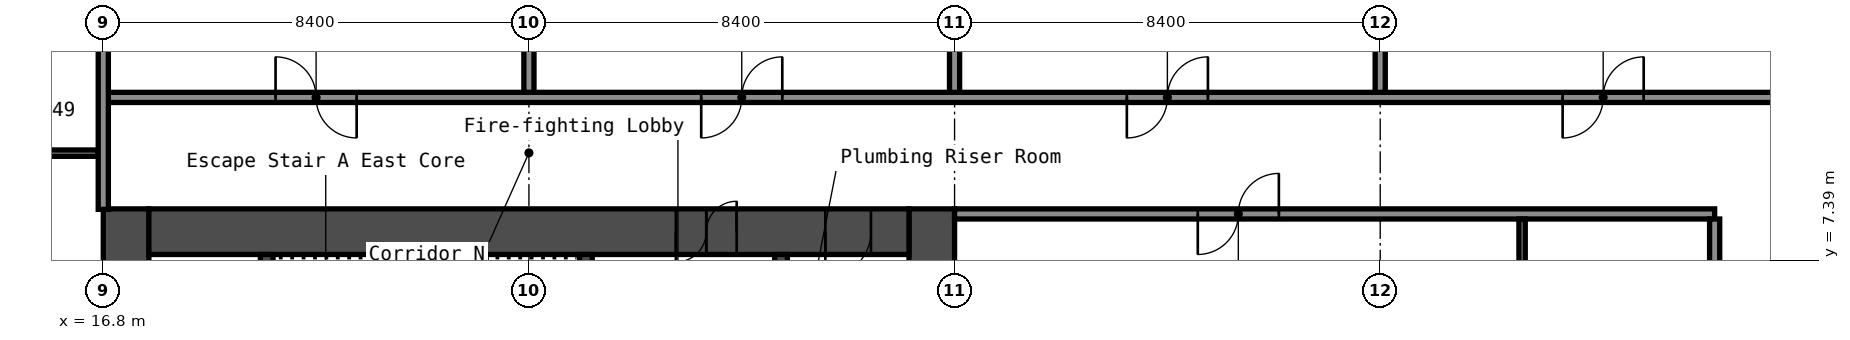
"""IFC4 building model, lengths in metres.
Left out: names, types, materials, properties, quantities, classifications, styles, units other than length and angle.
Written with IfcOpenShell. Run it as: python <this file> out.ifc"""

import sys

from ifc_helpers import new_model, si_unit, direction, frame, frame_2d, origin, place, context, subcontext, project, spatial, rectangle, extrude, element, fill, save


model = new_model("IFC4")
c1 = context("Model", 3, precision=1e-05, world=origin(), true_north=direction((0.0, 1.0)))
c2 = subcontext(c1, "Body", "Model", "MODEL_VIEW")
j1 = project(units=[si_unit("LENGTHUNIT", "METRE"), si_unit("PLANEANGLEUNIT", "RADIAN")], contexts=[c1])
p1 = place(None, origin())
s1 = spatial("IfcSite", under=j1, at=p1, CompositionType="ELEMENT")
p2 = place(p1, origin())
s2 = spatial("IfcBuilding", under=s1, at=p2, CompositionType="ELEMENT")
p3 = place(p2, frame((0.0, 0.0, 29.4)))
s3 = spatial("IfcBuildingStorey", under=s2, at=p3, CompositionType="ELEMENT", Elevation=29.4)
p4 = place(p3, frame((17.25, -8.4, 0.0), z_axis=(0.0, 0.0, 1.0), x_axis=(0.0, 1.0, 0.0)))
e1 = element("IfcWall", 1, at=p4, inside=s3, PredefinedType="SHEAR", context=c2, shape_type="SweptSolid", body=[
    extrude(rectangle(XDim=16.8, YDim=0.9, at=frame_2d((8.4, 0.0))), origin(), (0.0, 0.0, 1.0), 2.8),
])
p5 = place(p4, frame((12.75, 0.0, 0.0)))
e2 = element("IfcOpeningElement", 2, at=p5, cuts=e1, PredefinedType="OPENING", context=c2, shape_type="SweptSolid", body=[
    extrude(rectangle(XDim=1.2, YDim=2.1, at=frame_2d((0.6, 1.05))), frame((0.0, 0.46, 0.0), z_axis=(0.0, -1.0, 0.0), x_axis=(1.0, 0.0, 0.0)), (0.0, 0.0, 1.0), 0.92),
])
p6 = place(p4, frame((2.85, 0.0, 0.0)))
e3 = element("IfcOpeningElement", 3, at=p6, cuts=e1, PredefinedType="OPENING", context=c2, shape_type="SweptSolid", body=[
    extrude(rectangle(XDim=1.2, YDim=2.1, at=frame_2d((0.6, 1.05))), frame((0.0, 0.46, 0.0), z_axis=(0.0, -1.0, 0.0), x_axis=(1.0, 0.0, 0.0)), (0.0, 0.0, 1.0), 0.92),
])
p7 = place(p3, frame((33.15, -8.4, 0.0), z_axis=(0.0, 0.0, 1.0), x_axis=(0.0, 1.0, 0.0)))
e4 = element("IfcWall", 4, at=p7, inside=s3, PredefinedType="SHEAR", context=c2, shape_type="SweptSolid", body=[
    extrude(rectangle(XDim=16.8, YDim=0.9, at=frame_2d((8.4, 0.0))), origin(), (0.0, 0.0, 1.0), 2.8),
])
p8 = place(p3, frame((17.7, 7.95, 0.0), z_axis=(0.0, 0.0, 1.0), x_axis=(1.0, 0.0, 0.0)))
e5 = element("IfcWall", 5, at=p8, inside=s3, PredefinedType="SHEAR", context=c2, shape_type="SweptSolid", body=[
    extrude(rectangle(XDim=15.0, YDim=0.9, at=frame_2d((7.5, 0.0))), origin(), (0.0, 0.0, 1.0), 2.8),
])
p9 = place(p8, frame((10.4, 0.0, 0.0)))
e6 = element("IfcOpeningElement", 6, at=p9, cuts=e5, PredefinedType="OPENING", context=c2, shape_type="SweptSolid", body=[
    extrude(rectangle(XDim=1.2, YDim=2.1, at=frame_2d((0.6, 1.05))), frame((0.0, 0.46, 0.0), z_axis=(0.0, -1.0, 0.0), x_axis=(1.0, 0.0, 0.0)), (0.0, 0.0, 1.0), 0.92),
])
p10 = place(p8, frame((13.35, 0.0, 0.0)))
e7 = element("IfcOpeningElement", 7, at=p10, cuts=e5, PredefinedType="OPENING", context=c2, shape_type="SweptSolid", body=[
    extrude(rectangle(XDim=0.9, YDim=2.1, at=frame_2d((0.45, 1.05))), frame((0.0, 0.46, 0.0), z_axis=(0.0, -1.0, 0.0), x_axis=(1.0, 0.0, 0.0)), (0.0, 0.0, 1.0), 0.92),
])
p11 = place(p3, frame((20.025, 1.2, 0.0), z_axis=(0.0, 0.0, 1.0), x_axis=(0.0, 1.0, 0.0)))
e8 = element("IfcWall", 8, at=p11, inside=s3, PredefinedType="SHEAR", context=c2, shape_type="SweptSolid", body=[
    extrude(rectangle(XDim=6.3, YDim=0.25, at=frame_2d((3.15, 0.0))), origin(), (0.0, 0.0, 1.0), 2.8),
])
p12 = place(p3, frame((26.325, 3.75, 0.0), z_axis=(0.0, 0.0, 1.0), x_axis=(0.0, 1.0, 0.0)))
e9 = element("IfcWall", 9, at=p12, inside=s3, PredefinedType="SHEAR", context=c2, shape_type="SweptSolid", body=[
    extrude(rectangle(XDim=3.75, YDim=0.25, at=frame_2d((1.875, 0.0))), origin(), (0.0, 0.0, 1.0), 2.8),
])
p13 = place(p12, frame((1.25, 0.0, 0.0)))
e10 = element("IfcOpeningElement", 10, at=p13, cuts=e9, PredefinedType="OPENING", context=c2, shape_type="SweptSolid", body=[
    extrude(rectangle(XDim=1.2, YDim=2.1, at=frame_2d((0.6, 1.05))), frame((0.0, 0.135, 0.0), z_axis=(0.0, -1.0, 0.0), x_axis=(1.0, 0.0, 0.0)), (0.0, 0.0, 1.0), 0.27),
])
p14 = place(p3, frame((30.175, 1.45, 0.0), z_axis=(0.0, 0.0, 1.0), x_axis=(0.0, 1.0, 0.0)))
e11 = element("IfcWall", 11, at=p14, inside=s3, PredefinedType="SHEAR", context=c2, shape_type="SweptSolid", body=[
    extrude(rectangle(XDim=6.05, YDim=0.25, at=frame_2d((3.025, 0.0))), origin(), (0.0, 0.0, 1.0), 2.8),
])
p15 = place(p14, frame((2.625, 0.0, 0.0)))
e12 = element("IfcOpeningElement", 12, at=p15, cuts=e11, PredefinedType="OPENING", context=c2, shape_type="SweptSolid", body=[
    extrude(rectangle(XDim=1.1, YDim=2.1, at=frame_2d((0.55, 1.05))), frame((0.0, 0.135, 0.0), z_axis=(0.0, -1.0, 0.0), x_axis=(1.0, 0.0, 0.0)), (0.0, 0.0, 1.0), 0.27),
])
p16 = place(p3, frame((33.6, 8.3, 0.0), z_axis=(0.0, 0.0, 1.0), x_axis=(1.0, 0.0, 0.0)))
e13 = element("IfcWall", 13, at=p16, inside=s3, PredefinedType="PARTITIONING", context=c2, shape_type="SweptSolid", body=[
    extrude(rectangle(XDim=15.0, YDim=0.2, at=frame_2d((7.5, 0.0))), origin(), (0.0, 0.0, 1.0), 2.8),
])
p17 = place(p16, frame((4.8, 0.0, 0.0)))
e14 = element("IfcOpeningElement", 14, at=p17, cuts=e13, PredefinedType="OPENING", context=c2, shape_type="SweptSolid", body=[
    extrude(rectangle(XDim=1.6, YDim=2.1, at=frame_2d((0.8, 1.05))), frame((0.0, 0.11, 0.0), z_axis=(0.0, -1.0, 0.0), x_axis=(1.0, 0.0, 0.0)), (0.0, 0.0, 1.0), 0.22),
])
p18 = place(p3, frame((13.462, 9.5, 0.0), z_axis=(0.0, 0.0, 1.0), x_axis=(1.0, 0.0, 0.0)))
e15 = element("IfcWall", 15, at=p18, inside=s3, PredefinedType="PARTITIONING", context=c2, shape_type="SweptSolid", body=[
    extrude(rectangle(XDim=3.238, YDim=0.125, at=frame_2d((1.619, 0.0))), origin(), (0.0, 0.0, 1.0), 2.8),
])
p19 = place(p18, frame((1.238, 0.0, 0.0)))
e16 = element("IfcOpeningElement", 16, at=p19, cuts=e15, PredefinedType="OPENING", context=c2, shape_type="SweptSolid", body=[
    extrude(rectangle(XDim=0.8, YDim=2.1, at=frame_2d((0.4, 1.05))), frame((0.0, 0.073, 0.0), z_axis=(0.0, -1.0, 0.0), x_axis=(1.0, 0.0, 0.0)), (0.0, 0.0, 1.0), 0.145),
])
p20 = place(p3, frame((16.8, 10.6, 0.0), z_axis=(0.0, 0.0, 1.0), x_axis=(1.0, 0.0, 0.0)))
e17 = element("IfcWall", 17, at=p20, inside=s3, PredefinedType="PARTITIONING", context=c2, shape_type="SweptSolid", body=[
    extrude(rectangle(XDim=34.3, YDim=0.2, at=frame_2d((17.15, 0.0))), origin(), (0.0, 0.0, 1.0), 2.8),
])
p21 = place(p20, frame((3.4, 0.0, 0.0)))
e18 = element("IfcOpeningElement", 18, at=p21, cuts=e17, PredefinedType="OPENING", context=c2, shape_type="SweptSolid", body=[
    extrude(rectangle(XDim=1.6, YDim=2.1, at=frame_2d((0.8, 1.05))), frame((0.0, 0.11, 0.0), z_axis=(0.0, -1.0, 0.0), x_axis=(1.0, 0.0, 0.0)), (0.0, 0.0, 1.0), 0.22),
])
p22 = place(p20, frame((11.8, 0.0, 0.0)))
e19 = element("IfcOpeningElement", 19, at=p22, cuts=e17, PredefinedType="OPENING", context=c2, shape_type="SweptSolid", body=[
    extrude(rectangle(XDim=1.6, YDim=2.1, at=frame_2d((0.8, 1.05))), frame((0.0, 0.11, 0.0), z_axis=(0.0, -1.0, 0.0), x_axis=(1.0, 0.0, 0.0)), (0.0, 0.0, 1.0), 0.22),
])
p23 = place(p20, frame((20.2, 0.0, 0.0)))
e20 = element("IfcOpeningElement", 20, at=p23, cuts=e17, PredefinedType="OPENING", context=c2, shape_type="SweptSolid", body=[
    extrude(rectangle(XDim=1.6, YDim=2.1, at=frame_2d((0.8, 1.05))), frame((0.0, 0.11, 0.0), z_axis=(0.0, -1.0, 0.0), x_axis=(1.0, 0.0, 0.0)), (0.0, 0.0, 1.0), 0.22),
])
p24 = place(p20, frame((28.8, 0.0, 0.0)))
e21 = element("IfcOpeningElement", 21, at=p24, cuts=e17, PredefinedType="OPENING", context=c2, shape_type="SweptSolid", body=[
    extrude(rectangle(XDim=1.6, YDim=2.1, at=frame_2d((0.8, 1.05))), frame((0.0, 0.11, 0.0), z_axis=(0.0, -1.0, 0.0), x_axis=(1.0, 0.0, 0.0)), (0.0, 0.0, 1.0), 0.22),
])
p25 = place(p3, frame((16.8, 8.39, 0.0), z_axis=(0.0, 0.0, 1.0), x_axis=(0.0, 1.0, 0.0)))
e22 = element("IfcWall", 22, at=p25, inside=s3, PredefinedType="PARTITIONING", context=c2, shape_type="SweptSolid", body=[
    extrude(rectangle(XDim=11.91, YDim=0.2, at=frame_2d((5.955, 0.0))), origin(), (0.0, 0.0, 1.0), 2.8),
])
for number, where, z_axis, x_axis in (
    (23, (25.2, 10.7, 0.0), (0.0, 0.0, 1.0), (0.0, 1.0, 0.0)),
    (24, (33.6, 10.7, 0.0), (0.0, 0.0, 1.0), (0.0, 1.0, 0.0)),
    (25, (42.0, 10.7, 0.0), (0.0, 0.0, 1.0), (0.0, 1.0, 0.0)),
):
    element("IfcWall", number, at=place(p3, frame(where, z_axis=z_axis, x_axis=x_axis)), inside=s3, PredefinedType="PARTITIONING", context=c2, shape_type="SweptSolid", body=[
        extrude(rectangle(XDim=9.6, YDim=0.2, at=frame_2d((4.8, 0.0))), origin(), (0.0, 0.0, 1.0), 2.8),
    ])
p26 = place(p3, frame((44.8, 4.9, 0.0), z_axis=(0.0, 0.0, 1.0), x_axis=(0.0, 1.0, 0.0)))
e26 = element("IfcWall", 26, at=p26, inside=s3, PredefinedType="PARTITIONING", context=c2, shape_type="SweptSolid", body=[
    extrude(rectangle(XDim=3.3, YDim=0.125, at=frame_2d((1.65, 0.0))), origin(), (0.0, 0.0, 1.0), 2.8),
])
p27 = place(p3, frame((48.6, -8.2, 0.0), z_axis=(0.0, 0.0, 1.0), x_axis=(0.0, 1.0, 0.0)))
e27 = element("IfcWall", 27, at=p27, inside=s3, PredefinedType="PARTITIONING", context=c2, shape_type="SweptSolid", body=[
    extrude(rectangle(XDim=16.4, YDim=0.2, at=frame_2d((8.2, 0.0))), origin(), (0.0, 0.0, 1.0), 2.8),
])
p28 = place(p9, origin())
e28 = element("IfcDoor", 28, at=p28, inside=s3, OperationType="DOUBLE_DOOR_SINGLE_SWING", PredefinedType="DOOR", context=c2, shape_type="SweptSolid", body=[
    extrude(rectangle(XDim=1.2, YDim=2.1, at=frame_2d((0.6, 1.05))), frame((0.0, 0.025, 0.0), z_axis=(0.0, -1.0, 0.0), x_axis=(1.0, 0.0, 0.0)), (0.0, 0.0, 1.0), 0.05),
])
fill(e6, e28)
p29 = place(p10, origin())
e29 = element("IfcDoor", 29, at=p29, inside=s3, OperationType="SINGLE_SWING_LEFT", PredefinedType="DOOR", context=c2, shape_type="SweptSolid", body=[
    extrude(rectangle(XDim=0.9, YDim=2.1, at=frame_2d((0.45, 1.05))), frame((0.0, 0.025, 0.0), z_axis=(0.0, -1.0, 0.0), x_axis=(1.0, 0.0, 0.0)), (0.0, 0.0, 1.0), 0.05),
])
fill(e7, e29)
p30 = place(p17, origin())
e30 = element("IfcDoor", 30, at=p30, inside=s3, OperationType="DOUBLE_DOOR_SINGLE_SWING", PredefinedType="DOOR", context=c2, shape_type="SweptSolid", body=[
    extrude(rectangle(XDim=1.6, YDim=2.1, at=frame_2d((0.8, 1.05))), frame((0.0, 0.025, 0.0), z_axis=(0.0, -1.0, 0.0), x_axis=(1.0, 0.0, 0.0)), (0.0, 0.0, 1.0), 0.05),
])
fill(e14, e30)
p31 = place(p21, origin())
e31 = element("IfcDoor", 31, at=p31, inside=s3, OperationType="DOUBLE_DOOR_SINGLE_SWING", PredefinedType="DOOR", context=c2, shape_type="SweptSolid", body=[
    extrude(rectangle(XDim=1.6, YDim=2.1, at=frame_2d((0.8, 1.05))), frame((0.0, 0.025, 0.0), z_axis=(0.0, -1.0, 0.0), x_axis=(1.0, 0.0, 0.0)), (0.0, 0.0, 1.0), 0.05),
])
fill(e18, e31)
p32 = place(p22, origin())
e32 = element("IfcDoor", 32, at=p32, inside=s3, OperationType="DOUBLE_DOOR_SINGLE_SWING", PredefinedType="DOOR", context=c2, shape_type="SweptSolid", body=[
    extrude(rectangle(XDim=1.6, YDim=2.1, at=frame_2d((0.8, 1.05))), frame((0.0, 0.025, 0.0), z_axis=(0.0, -1.0, 0.0), x_axis=(1.0, 0.0, 0.0)), (0.0, 0.0, 1.0), 0.05),
])
fill(e19, e32)
p33 = place(p23, origin())
e33 = element("IfcDoor", 33, at=p33, inside=s3, OperationType="DOUBLE_DOOR_SINGLE_SWING", PredefinedType="DOOR", context=c2, shape_type="SweptSolid", body=[
    extrude(rectangle(XDim=1.6, YDim=2.1, at=frame_2d((0.8, 1.05))), frame((0.0, 0.025, 0.0), z_axis=(0.0, -1.0, 0.0), x_axis=(1.0, 0.0, 0.0)), (0.0, 0.0, 1.0), 0.05),
])
fill(e20, e33)
p34 = place(p24, origin())
e34 = element("IfcDoor", 34, at=p34, inside=s3, OperationType="DOUBLE_DOOR_SINGLE_SWING", PredefinedType="DOOR", context=c2, shape_type="SweptSolid", body=[
    extrude(rectangle(XDim=1.6, YDim=2.1, at=frame_2d((0.8, 1.05))), frame((0.0, 0.025, 0.0), z_axis=(0.0, -1.0, 0.0), x_axis=(1.0, 0.0, 0.0)), (0.0, 0.0, 1.0), 0.05),
])
fill(e21, e34)
save(model, sys.argv[1])
